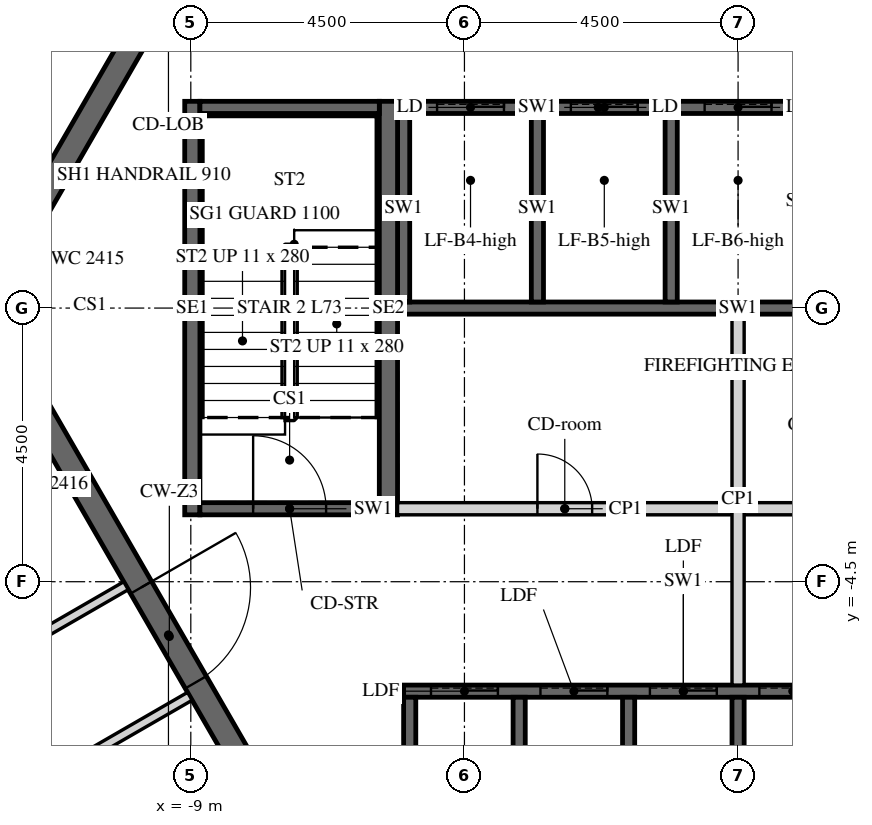
"""IFC4 building model, lengths in metres.
Left out: names, types, materials, properties, quantities, classifications, styles, units other than length and angle.
Written with IfcOpenShell. Run it as: python <this file> out.ifc"""

import sys

from ifc_helpers import new_model, si_unit, direction, frame, frame_2d, origin, place, context, subcontext, project, spatial, polyline, rectangle, outline, extrude, element, fill, save


model = new_model("IFC4")
c1 = context("Model", 3, precision=1e-05, world=origin(), true_north=direction((0.0, 1.0)))
c2 = subcontext(c1, "Body", "Model", "MODEL_VIEW")
j1 = project(units=[si_unit("LENGTHUNIT", "METRE"), si_unit("PLANEANGLEUNIT", "RADIAN")], contexts=[c1])
p1 = place(None, origin())
s1 = spatial("IfcSite", under=j1, at=p1, CompositionType="ELEMENT")
p2 = place(p1, origin())
s2 = spatial("IfcBuilding", under=s1, at=p2, CompositionType="ELEMENT")
p3 = place(p2, frame((0.0, 0.0, 303.0)))
s3 = spatial("IfcBuildingStorey", under=s2, at=p3, CompositionType="ELEMENT", Elevation=303.0)
p4 = place(p3, frame((-6.235, 10.8, -0.15), z_axis=(0.0, 0.0, 1.0), x_axis=(-0.499996419489, -0.866027470984, 0.0)))
e1 = element("IfcWall", 1, at=p4, inside=s3, PredefinedType="SHEAR", context=c2, shape_type="SweptSolid", body=[
    extrude(outline(polyline([(-0.115, -0.2), (12.586, -0.2), (12.355, 0.2), (0.115, 0.2), (-0.115, -0.2)])), origin(), (0.0, 0.0, 1.0), 3.9),
])
p5 = place(p4, frame((5.364, 0.0, 0.15)))
e2 = element("IfcOpeningElement", 2, at=p5, cuts=e1, PredefinedType="OPENING", context=c2, shape_type="SweptSolid", body=[
    extrude(rectangle(XDim=1.8, YDim=2.4, at=frame_2d((0.9, 1.2))), frame((0.0, 0.21, 0.0), z_axis=(0.0, -1.0, 0.0), x_axis=(1.0, 0.0, 0.0)), (0.0, 0.0, 1.0), 0.42),
])
p6 = place(p3, frame((-12.471, 0.0, -0.15), z_axis=(0.0, 0.0, 1.0), x_axis=(0.499996419489, -0.866027470984, 0.0)))
e3 = element("IfcWall", 3, at=p6, inside=s3, PredefinedType="SHEAR", context=c2, shape_type="SweptSolid", body=[
    extrude(outline(polyline([(-0.115, -0.2), (12.586, -0.2), (12.355, 0.2), (0.115, 0.2), (-0.115, -0.2)])), origin(), (0.0, 0.0, 1.0), 3.9),
])
p7 = place(p6, frame((5.306, 0.0, 0.15)))
e4 = element("IfcOpeningElement", 4, at=p7, cuts=e3, PredefinedType="OPENING", context=c2, shape_type="SweptSolid", body=[
    extrude(rectangle(XDim=1.8, YDim=2.4, at=frame_2d((0.9, 1.2))), frame((0.0, 0.21, 0.0), z_axis=(0.0, -1.0, 0.0), x_axis=(1.0, 0.0, 0.0)), (0.0, 0.0, 1.0), 0.42),
])
p8 = place(p3, frame((-5.6, 3.3, -0.25), z_axis=(0.0, 0.0, 1.0), x_axis=(1.0, 0.0, 0.0)))
e5 = element("IfcWall", 5, at=p8, inside=s3, PredefinedType="SHEAR", context=c2, shape_type="SweptSolid", body=[
    extrude(rectangle(XDim=6.6, YDim=0.2, at=frame_2d((3.3, 0.0))), origin(), (0.0, 0.0, 1.0), 3.9),
])
p9 = place(p8, frame((0.65, 0.0, 0.25)))
e6 = element("IfcOpeningElement", 6, at=p9, cuts=e5, PredefinedType="OPENING", context=c2, shape_type="SweptSolid", body=[
    extrude(rectangle(XDim=1.1, YDim=2.1, at=frame_2d((0.55, 1.05))), frame((0.0, 0.11, 0.0), z_axis=(0.0, -1.0, 0.0), x_axis=(1.0, 0.0, 0.0)), (0.0, 0.0, 1.0), 0.22),
])
p10 = place(p8, frame((2.85, 0.0, 0.25)))
e7 = element("IfcOpeningElement", 7, at=p10, cuts=e5, PredefinedType="OPENING", context=c2, shape_type="SweptSolid", body=[
    extrude(rectangle(XDim=1.1, YDim=2.1, at=frame_2d((0.55, 1.05))), frame((0.0, 0.11, 0.0), z_axis=(0.0, -1.0, 0.0), x_axis=(1.0, 0.0, 0.0)), (0.0, 0.0, 1.0), 0.22),
])
p11 = place(p8, frame((5.05, 0.0, 0.25)))
e8 = element("IfcOpeningElement", 8, at=p11, cuts=e5, PredefinedType="OPENING", context=c2, shape_type="SweptSolid", body=[
    extrude(rectangle(XDim=1.1, YDim=2.1, at=frame_2d((0.55, 1.05))), frame((0.0, 0.11, 0.0), z_axis=(0.0, -1.0, 0.0), x_axis=(1.0, 0.0, 0.0)), (0.0, 0.0, 1.0), 0.22),
])
p12 = place(p3, frame((-5.6, 0.0, -0.25), z_axis=(0.0, 0.0, 1.0), x_axis=(1.0, 0.0, 0.0)))
e9 = element("IfcWall", 9, at=p12, inside=s3, PredefinedType="SHEAR", context=c2, shape_type="SweptSolid", body=[
    extrude(rectangle(XDim=11.2, YDim=0.2, at=frame_2d((5.6, 0.0))), origin(), (0.0, 0.0, 1.0), 3.9),
])
for number, where, z_axis, x_axis in (
    (10, (-5.5, 0.1, -0.25), (0.0, 0.0, 1.0), (0.0, 1.0, 0.0)),
    (11, (-3.3, 0.1, -0.25), (0.0, 0.0, 1.0), (0.0, 1.0, 0.0)),
    (12, (-1.1, 0.1, -0.25), (0.0, 0.0, 1.0), (0.0, 1.0, 0.0)),
):
    element("IfcWall", number, at=place(p3, frame(where, z_axis=z_axis, x_axis=x_axis)), inside=s3, PredefinedType="SHEAR", context=c2, shape_type="SweptSolid", body=[
        extrude(rectangle(XDim=3.1, YDim=0.2, at=frame_2d((1.55, 0.0))), origin(), (0.0, 0.0, 1.0), 3.9),
    ])
p13 = place(p3, frame((-5.5, -6.3, -0.25), z_axis=(0.0, 0.0, 1.0), x_axis=(1.0, 0.0, 0.0)))
e13 = element("IfcWall", 13, at=p13, inside=s3, PredefinedType="SHEAR", context=c2, shape_type="SweptSolid", body=[
    extrude(rectangle(XDim=9.2, YDim=0.2, at=frame_2d((4.6, 0.0))), origin(), (0.0, 0.0, 1.0), 3.9),
])
p14 = place(p13, frame((0.45, 0.0, 0.25)))
e14 = element("IfcOpeningElement", 14, at=p14, cuts=e13, PredefinedType="OPENING", context=c2, shape_type="SweptSolid", body=[
    extrude(rectangle(XDim=1.1, YDim=2.1, at=frame_2d((0.55, 1.05))), frame((0.0, 0.11, 0.0), z_axis=(0.0, -1.0, 0.0), x_axis=(1.0, 0.0, 0.0)), (0.0, 0.0, 1.0), 0.22),
])
p15 = place(p13, frame((2.25, 0.0, 0.25)))
e15 = element("IfcOpeningElement", 15, at=p15, cuts=e13, PredefinedType="OPENING", context=c2, shape_type="SweptSolid", body=[
    extrude(rectangle(XDim=1.1, YDim=2.1, at=frame_2d((0.55, 1.05))), frame((0.0, 0.11, 0.0), z_axis=(0.0, -1.0, 0.0), x_axis=(1.0, 0.0, 0.0)), (0.0, 0.0, 1.0), 0.22),
])
p16 = place(p13, frame((4.05, 0.0, 0.25)))
e16 = element("IfcOpeningElement", 16, at=p16, cuts=e13, PredefinedType="OPENING", context=c2, shape_type="SweptSolid", body=[
    extrude(rectangle(XDim=1.1, YDim=2.1, at=frame_2d((0.55, 1.05))), frame((0.0, 0.11, 0.0), z_axis=(0.0, -1.0, 0.0), x_axis=(1.0, 0.0, 0.0)), (0.0, 0.0, 1.0), 0.22),
])
p17 = place(p13, frame((5.85, 0.0, 0.25)))
e17 = element("IfcOpeningElement", 17, at=p17, cuts=e13, PredefinedType="OPENING", context=c2, shape_type="SweptSolid", body=[
    extrude(rectangle(XDim=1.1, YDim=2.1, at=frame_2d((0.55, 1.05))), frame((0.0, 0.11, 0.0), z_axis=(0.0, -1.0, 0.0), x_axis=(1.0, 0.0, 0.0)), (0.0, 0.0, 1.0), 0.22),
])
p18 = place(p13, frame((7.65, 0.0, 0.25)))
e18 = element("IfcOpeningElement", 18, at=p18, cuts=e13, PredefinedType="OPENING", context=c2, shape_type="SweptSolid", body=[
    extrude(rectangle(XDim=1.1, YDim=2.1, at=frame_2d((0.55, 1.05))), frame((0.0, 0.11, 0.0), z_axis=(0.0, -1.0, 0.0), x_axis=(1.0, 0.0, 0.0)), (0.0, 0.0, 1.0), 0.22),
])
for number, where, z_axis, x_axis in (
    (19, (-5.4, -9.3, -0.25), (0.0, 0.0, 1.0), (0.0, 1.0, 0.0)),
    (20, (-3.6, -9.3, -0.25), (0.0, 0.0, 1.0), (0.0, 1.0, 0.0)),
    (21, (-1.8, -9.3, -0.25), (0.0, 0.0, 1.0), (0.0, 1.0, 0.0)),
    (22, (0.0, -9.3, -0.25), (0.0, 0.0, 1.0), (0.0, 1.0, 0.0)),
):
    element("IfcWall", number, at=place(p3, frame(where, z_axis=z_axis, x_axis=x_axis)), inside=s3, PredefinedType="SHEAR", context=c2, shape_type="SweptSolid", body=[
        extrude(rectangle(XDim=2.9, YDim=0.2, at=frame_2d((1.45, 0.0))), origin(), (0.0, 0.0, 1.0), 3.9),
    ])
p19 = place(p3, frame((-5.6, -3.3, 0.0), z_axis=(0.0, 0.0, 1.0), x_axis=(1.0, 0.0, 0.0)))
e23 = element("IfcWall", 23, at=p19, inside=s3, PredefinedType="PARTITIONING", context=c2, shape_type="SweptSolid", body=[
    extrude(rectangle(XDim=5.5, YDim=0.2, at=frame_2d((2.75, 0.0))), origin(), (0.0, 0.0, 1.0), 3.65),
])
p20 = place(p19, frame((2.3, 0.0, 0.0)))
e24 = element("IfcOpeningElement", 24, at=p20, cuts=e23, PredefinedType="OPENING", context=c2, shape_type="SweptSolid", body=[
    extrude(rectangle(XDim=0.9, YDim=2.1, at=frame_2d((0.45, 1.05))), frame((0.0, 0.11, 0.0), z_axis=(0.0, -1.0, 0.0), x_axis=(1.0, 0.0, 0.0)), (0.0, 0.0, 1.0), 0.22),
])
p21 = place(p3, frame((0.1, -3.3, 0.0), z_axis=(0.0, 0.0, 1.0), x_axis=(1.0, 0.0, 0.0)))
e25 = element("IfcWall", 25, at=p21, inside=s3, PredefinedType="PARTITIONING", context=c2, shape_type="SweptSolid", body=[
    extrude(rectangle(XDim=2.85, YDim=0.2, at=frame_2d((1.425, 0.0))), origin(), (0.0, 0.0, 1.0), 3.65),
])
p22 = place(p21, frame((0.875, 0.0, 0.0)))
e26 = element("IfcOpeningElement", 26, at=p22, cuts=e25, PredefinedType="OPENING", context=c2, shape_type="SweptSolid", body=[
    extrude(rectangle(XDim=0.9, YDim=2.1, at=frame_2d((0.45, 1.05))), frame((0.0, 0.11, 0.0), z_axis=(0.0, -1.0, 0.0), x_axis=(1.0, 0.0, 0.0)), (0.0, 0.0, 1.0), 0.22),
])
p23 = place(p3, frame((0.0, -6.2, 0.0), z_axis=(0.0, 0.0, 1.0), x_axis=(0.0, 1.0, 0.0)))
e27 = element("IfcWall", 27, at=p23, inside=s3, PredefinedType="PARTITIONING", context=c2, shape_type="SweptSolid", body=[
    extrude(rectangle(XDim=6.1, YDim=0.2, at=frame_2d((3.05, 0.0))), origin(), (0.0, 0.0, 1.0), 3.65),
])
p24 = place(p3, frame((-5.75, -3.4, -0.25), z_axis=(0.0, 0.0, 1.0), x_axis=(0.0, 1.0, 0.0)))
e28 = element("IfcWall", 28, at=p24, inside=s3, PredefinedType="SHEAR", context=c2, shape_type="SweptSolid", body=[
    extrude(rectangle(XDim=6.8, YDim=0.3, at=frame_2d((3.4, 0.0))), origin(), (0.0, 0.0, 1.0), 3.9),
])
p25 = place(p3, frame((-8.975, -3.4, -0.25), z_axis=(0.0, 0.0, 1.0), x_axis=(0.0, 1.0, 0.0)))
e29 = element("IfcWall", 29, at=p25, inside=s3, PredefinedType="SHEAR", context=c2, shape_type="SweptSolid", body=[
    extrude(rectangle(XDim=6.8, YDim=0.25, at=frame_2d((3.4, 0.0))), origin(), (0.0, 0.0, 1.0), 3.9),
])
p26 = place(p3, frame((-8.85, 3.3, -0.25), z_axis=(0.0, 0.0, 1.0), x_axis=(1.0, 0.0, 0.0)))
e30 = element("IfcWall", 30, at=p26, inside=s3, PredefinedType="SHEAR", context=c2, shape_type="SweptSolid", body=[
    extrude(rectangle(XDim=2.95, YDim=0.2, at=frame_2d((1.475, 0.0))), origin(), (0.0, 0.0, 1.0), 3.9),
])
p27 = place(p3, frame((-8.85, -3.3, -0.25), z_axis=(0.0, 0.0, 1.0), x_axis=(1.0, 0.0, 0.0)))
e31 = element("IfcWall", 31, at=p27, inside=s3, PredefinedType="SHEAR", context=c2, shape_type="SweptSolid", body=[
    extrude(rectangle(XDim=2.95, YDim=0.2, at=frame_2d((1.475, 0.0))), origin(), (0.0, 0.0, 1.0), 3.9),
])
p28 = place(p27, frame((0.875, 0.0, 0.25)))
e32 = element("IfcOpeningElement", 32, at=p28, cuts=e31, PredefinedType="OPENING", context=c2, shape_type="SweptSolid", body=[
    extrude(rectangle(XDim=1.2, YDim=2.4, at=frame_2d((0.6, 1.2))), frame((0.0, 0.11, 0.0), z_axis=(0.0, -1.0, 0.0), x_axis=(1.0, 0.0, 0.0)), (0.0, 0.0, 1.0), 0.22),
])
p29 = place(p3, frame((-8.434, 16.925, 0.0), z_axis=(0.0, 0.0, 1.0), x_axis=(-0.438371383278, -0.898793930956, 0.0)))
e33 = element("IfcWall", 33, at=p29, inside=s3, PredefinedType="PARTITIONING", context=c2, shape_type="SweptSolid", body=[
    extrude(rectangle(XDim=16.939, YDim=0.15, at=frame_2d((8.47, 0.0))), origin(), (0.0, 0.0, 1.0), 2.988),
])
p30 = place(p29, frame((9.89, 0.0, 0.0)))
e34 = element("IfcOpeningElement", 34, at=p30, cuts=e33, PredefinedType="OPENING", context=c2, shape_type="SweptSolid", body=[
    extrude(rectangle(XDim=1.0, YDim=2.1, at=frame_2d((0.5, 1.05))), frame((0.0, 0.085, 0.0), z_axis=(0.0, -1.0, 0.0), x_axis=(1.0, 0.0, 0.0)), (0.0, 0.0, 1.0), 0.17),
])
p31 = place(p3, frame((-18.036, -2.761, 0.0), z_axis=(0.0, 0.0, 1.0), x_axis=(0.499996279807, -0.866027551628, 0.0)))
e35 = element("IfcWall", 35, at=p31, inside=s3, PredefinedType="PARTITIONING", context=c2, shape_type="SweptSolid", body=[
    extrude(rectangle(XDim=15.024, YDim=0.15, at=frame_2d((7.512, 0.0))), origin(), (0.0, 0.0, 1.0), 2.988),
])
p32 = place(p31, frame((0.8, 0.0, 0.0)))
e36 = element("IfcOpeningElement", 36, at=p32, cuts=e35, PredefinedType="OPENING", context=c2, shape_type="SweptSolid", body=[
    extrude(rectangle(XDim=1.0, YDim=2.1, at=frame_2d((0.5, 1.05))), frame((0.0, 0.085, 0.0), z_axis=(0.0, -1.0, 0.0), x_axis=(1.0, 0.0, 0.0)), (0.0, 0.0, 1.0), 0.17),
])
p33 = place(p31, frame((13.874, 0.0, 0.0)))
e37 = element("IfcOpeningElement", 37, at=p33, cuts=e35, PredefinedType="OPENING", context=c2, shape_type="SweptSolid", body=[
    extrude(rectangle(XDim=1.0, YDim=2.1, at=frame_2d((0.5, 1.05))), frame((0.0, 0.085, 0.0), z_axis=(0.0, -1.0, 0.0), x_axis=(1.0, 0.0, 0.0)), (0.0, 0.0, 1.0), 0.17),
])
p34 = place(p3, frame((-10.066, -4.566, 0.0), z_axis=(0.0, 0.0, 1.0), x_axis=(-0.866031096941, -0.499990139034, 0.0)))
e38 = element("IfcWall", 38, at=p34, inside=s3, PredefinedType="PARTITIONING", context=c2, shape_type="SweptSolid", body=[
    extrude(rectangle(XDim=4.5, YDim=0.15, at=frame_2d((2.25, 0.0))), origin(), (0.0, 0.0, 1.0), 2.988),
])
p35 = place(p3, frame((-12.848, -8.597, 0.0), z_axis=(0.0, 0.0, 1.0), x_axis=(0.866017452598, 0.500013771606, 0.0)))
e39 = element("IfcWall", 39, at=p35, inside=s3, PredefinedType="PARTITIONING", context=c2, shape_type="SweptSolid", body=[
    extrude(rectangle(XDim=4.425, YDim=0.15, at=frame_2d((2.213, 0.0))), origin(), (0.0, 0.0, 1.0), 2.988),
])
p36 = place(p7, origin())
e40 = element("IfcDoor", 40, at=p36, inside=s3, OperationType="DOUBLE_DOOR_SINGLE_SWING", PredefinedType="DOOR", context=c2, shape_type="SweptSolid", body=[
    extrude(rectangle(XDim=1.8, YDim=2.4, at=frame_2d((0.9, 1.2))), frame((0.0, 0.025, 0.0), z_axis=(0.0, -1.0, 0.0), x_axis=(1.0, 0.0, 0.0)), (0.0, 0.0, 1.0), 0.05),
])
fill(e4, e40)
p37 = place(p20, origin())
e41 = element("IfcDoor", 41, at=p37, inside=s3, OperationType="SINGLE_SWING_LEFT", PredefinedType="DOOR", context=c2, shape_type="SweptSolid", body=[
    extrude(rectangle(XDim=0.9, YDim=2.1, at=frame_2d((0.45, 1.05))), frame((0.0, 0.025, 0.0), z_axis=(0.0, -1.0, 0.0), x_axis=(1.0, 0.0, 0.0)), (0.0, 0.0, 1.0), 0.05),
])
fill(e24, e41)
p38 = place(p28, origin())
e42 = element("IfcDoor", 42, at=p38, inside=s3, OperationType="SINGLE_SWING_LEFT", PredefinedType="DOOR", context=c2, shape_type="SweptSolid", body=[
    extrude(rectangle(XDim=1.2, YDim=2.4, at=frame_2d((0.6, 1.2))), frame((0.0, 0.025, 0.0), z_axis=(0.0, -1.0, 0.0), x_axis=(1.0, 0.0, 0.0)), (0.0, 0.0, 1.0), 0.05),
])
fill(e32, e42)
p39 = place(p9, origin())
e43 = element("IfcDoor", 43, at=p39, inside=s3, OperationType="SLIDING_TO_LEFT", PredefinedType="DOOR", context=c2, shape_type="SweptSolid", body=[
    extrude(rectangle(XDim=1.1, YDim=2.1, at=frame_2d((0.55, 1.05))), frame((0.0, 0.025, 0.0), z_axis=(0.0, -1.0, 0.0), x_axis=(1.0, 0.0, 0.0)), (0.0, 0.0, 1.0), 0.05),
])
fill(e6, e43)
p40 = place(p10, origin())
e44 = element("IfcDoor", 44, at=p40, inside=s3, OperationType="SLIDING_TO_LEFT", PredefinedType="DOOR", context=c2, shape_type="SweptSolid", body=[
    extrude(rectangle(XDim=1.1, YDim=2.1, at=frame_2d((0.55, 1.05))), frame((0.0, 0.025, 0.0), z_axis=(0.0, -1.0, 0.0), x_axis=(1.0, 0.0, 0.0)), (0.0, 0.0, 1.0), 0.05),
])
fill(e7, e44)
p41 = place(p11, origin())
e45 = element("IfcDoor", 45, at=p41, inside=s3, OperationType="SLIDING_TO_LEFT", PredefinedType="DOOR", context=c2, shape_type="SweptSolid", body=[
    extrude(rectangle(XDim=1.1, YDim=2.1, at=frame_2d((0.55, 1.05))), frame((0.0, 0.025, 0.0), z_axis=(0.0, -1.0, 0.0), x_axis=(1.0, 0.0, 0.0)), (0.0, 0.0, 1.0), 0.05),
])
fill(e8, e45)
p42 = place(p14, origin())
e46 = element("IfcDoor", 46, at=p42, inside=s3, OperationType="SLIDING_TO_LEFT", PredefinedType="DOOR", context=c2, shape_type="SweptSolid", body=[
    extrude(rectangle(XDim=1.1, YDim=2.1, at=frame_2d((0.55, 1.05))), frame((0.0, 0.025, 0.0), z_axis=(0.0, -1.0, 0.0), x_axis=(1.0, 0.0, 0.0)), (0.0, 0.0, 1.0), 0.05),
])
fill(e14, e46)
p43 = place(p15, origin())
e47 = element("IfcDoor", 47, at=p43, inside=s3, OperationType="SLIDING_TO_LEFT", PredefinedType="DOOR", context=c2, shape_type="SweptSolid", body=[
    extrude(rectangle(XDim=1.1, YDim=2.1, at=frame_2d((0.55, 1.05))), frame((0.0, 0.025, 0.0), z_axis=(0.0, -1.0, 0.0), x_axis=(1.0, 0.0, 0.0)), (0.0, 0.0, 1.0), 0.05),
])
fill(e15, e47)
p44 = place(p16, origin())
e48 = element("IfcDoor", 48, at=p44, inside=s3, OperationType="SLIDING_TO_LEFT", PredefinedType="DOOR", context=c2, shape_type="SweptSolid", body=[
    extrude(rectangle(XDim=1.1, YDim=2.1, at=frame_2d((0.55, 1.05))), frame((0.0, 0.025, 0.0), z_axis=(0.0, -1.0, 0.0), x_axis=(1.0, 0.0, 0.0)), (0.0, 0.0, 1.0), 0.05),
])
fill(e16, e48)
p45 = place(p17, origin())
e49 = element("IfcDoor", 49, at=p45, inside=s3, OperationType="SLIDING_TO_LEFT", PredefinedType="DOOR", context=c2, shape_type="SweptSolid", body=[
    extrude(rectangle(XDim=1.1, YDim=2.1, at=frame_2d((0.55, 1.05))), frame((0.0, 0.025, 0.0), z_axis=(0.0, -1.0, 0.0), x_axis=(1.0, 0.0, 0.0)), (0.0, 0.0, 1.0), 0.05),
])
fill(e17, e49)
save(model, sys.argv[1])
